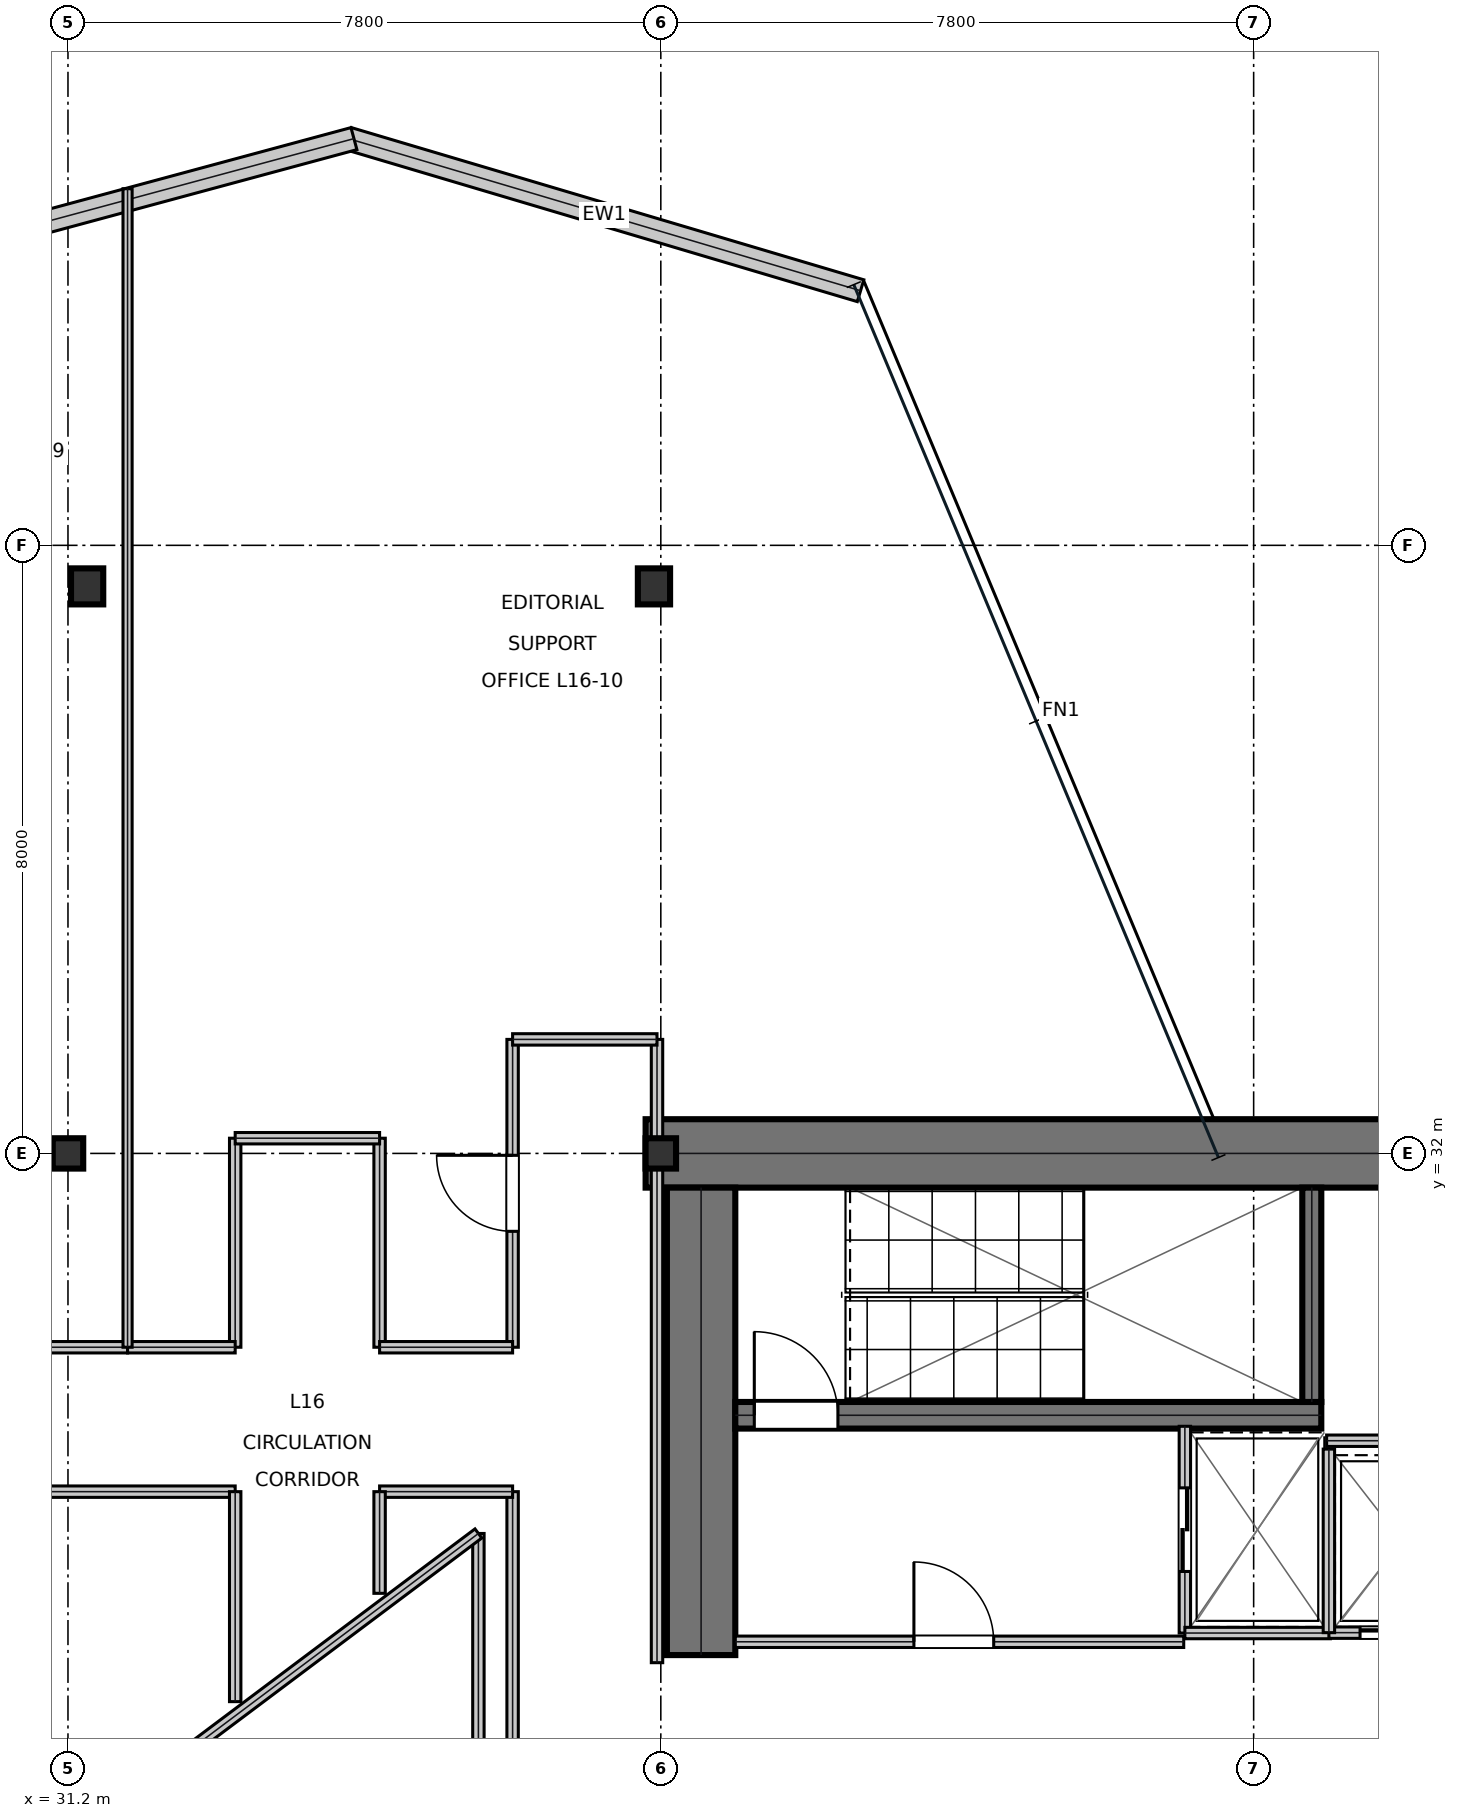
"""IFC4 building model, lengths in metres.
Left out: names, types, materials, properties, quantities, classifications, styles, units other than length and angle.
Written with IfcOpenShell. Run it as: python <this file> out.ifc"""

import sys

from ifc_helpers import new_model, si_unit, direction, frame, frame_2d, origin, origin_2d, place, context, subcontext, project, spatial, rectangle, i_section, extrude, element, fill, save


model = new_model("IFC4")
c1 = context("Model", 3, precision=1e-05, world=origin(), true_north=direction((0.0, 1.0)))
c2 = subcontext(c1, "Body", "Model", "MODEL_VIEW")
j1 = project(units=[si_unit("LENGTHUNIT", "METRE"), si_unit("PLANEANGLEUNIT", "RADIAN")], contexts=[c1])
p1 = place(None, origin())
s1 = spatial("IfcSite", under=j1, at=p1, CompositionType="ELEMENT")
p2 = place(p1, origin())
s2 = spatial("IfcBuilding", under=s1, at=p2, CompositionType="ELEMENT")
p3 = place(p2, frame((0.0, 0.0, 74.25)))
s3 = spatial("IfcBuildingStorey", under=s2, at=p3, CompositionType="ELEMENT", Elevation=74.25)
p4 = place(p3, frame((38.8, 32.0, 0.0), z_axis=(0.0, 0.0, 1.0), x_axis=(1.0, 0.0, 0.0)))
e1 = element("IfcWall", 1, at=p4, inside=s3, PredefinedType="SHEAR", context=c2, shape_type="SweptSolid", body=[
    extrude(rectangle(XDim=16.0, YDim=0.9, at=frame_2d((8.0, 0.0))), origin(), (0.0, 0.0, 1.0), 3.81),
])
p5 = place(p3, frame((39.53, 25.4, 0.0), z_axis=(0.0, 0.0, 1.0), x_axis=(0.0, 1.0, 0.0)))
e2 = element("IfcWall", 2, at=p5, inside=s3, PredefinedType="SHEAR", context=c2, shape_type="SweptSolid", body=[
    extrude(rectangle(XDim=6.15, YDim=0.9, at=frame_2d((3.075, 0.0))), origin(), (0.0, 0.0, 1.0), 3.81),
])
p6 = place(p3, frame((39.98, 28.555, 0.0), z_axis=(0.0, 0.0, 1.0), x_axis=(1.0, 0.0, 0.0)))
e3 = element("IfcWall", 3, at=p6, inside=s3, PredefinedType="SHEAR", context=c2, shape_type="SweptSolid", body=[
    extrude(rectangle(XDim=7.71, YDim=0.35, at=frame_2d((3.855, 0.0))), origin(), (0.0, 0.0, 1.0), 3.81),
])
p7 = place(p6, frame((0.25, 0.0, 0.0)))
e4 = element("IfcOpeningElement", 4, at=p7, cuts=e3, PredefinedType="OPENING", context=c2, shape_type="SweptSolid", body=[
    extrude(rectangle(XDim=1.1, YDim=2.15, at=frame_2d((0.55, 1.075))), frame((0.0, 0.185, 0.0), z_axis=(0.0, -1.0, 0.0), x_axis=(1.0, 0.0, 0.0)), (0.0, 0.0, 1.0), 0.37),
])
p8 = place(p3, frame((47.565, 28.73, 0.0), z_axis=(0.0, 0.0, 1.0), x_axis=(0.0, 1.0, 0.0)))
e5 = element("IfcWall", 5, at=p8, inside=s3, PredefinedType="SHEAR", context=c2, shape_type="SweptSolid", body=[
    extrude(rectangle(XDim=2.82, YDim=0.25, at=frame_2d((1.41, 0.0))), origin(), (0.0, 0.0, 1.0), 3.81),
])
for number, where, z_axis, x_axis in (
    (6, (31.2, 32.0, 0.0), (0.0, 0.0, 1.0), (1.0, 0.0, 0.0)),
    (7, (39.0, 32.0, 0.0), (0.0, 0.0, 1.0), (1.0, 0.0, 0.0)),
):
    element("IfcColumn", number, at=place(p3, frame(where, z_axis=z_axis, x_axis=x_axis)), inside=s3, PredefinedType="COLUMN", context=c2, shape_type="SweptSolid", body=[
        extrude(i_section(OverallWidth=0.401, OverallDepth=0.399, WebThickness=0.025, FlangeThickness=0.04, at=origin_2d()), origin(), (0.0, 0.0, 1.0), 4.044),
    ])
for number, where, z_axis, x_axis in (
    (8, (31.452, 39.46, 0.016), (0.0, 0.0, 1.0), (1.0, 0.0, 0.0)),
    (9, (38.91, 39.46, 0.016), (0.0, 0.0, 1.0), (1.0, 0.0, 0.0)),
):
    element("IfcColumn", number, at=place(p3, frame(where, z_axis=z_axis, x_axis=x_axis)), inside=s3, PredefinedType="COLUMN", context=c2, shape_type="SweptSolid", body=[
        extrude(i_section(OverallWidth=0.424, OverallDepth=0.474, WebThickness=0.048, FlangeThickness=0.077, at=origin_2d()), origin(), (0.0, 0.0, 1.0), 4.018),
    ])
p9 = place(p3, frame((41.628, 43.35, 0.0), z_axis=(0.0, 0.0, 1.0), x_axis=(-0.958632659024, 0.284646140064, 0.0)))
e10 = element("IfcWall", 10, at=p9, inside=s3, PredefinedType="STANDARD", context=c2, shape_type="SweptSolid", body=[
    extrude(rectangle(XDim=7.033, YDim=0.3, at=frame_2d((3.517, 0.0))), origin(), (0.0, 0.0, 1.0), 3.81),
])
p10 = place(p3, frame((34.962, 45.351, 0.0), z_axis=(0.0, 0.0, 1.0), x_axis=(-0.965438319853, -0.260631637679, 0.0)))
e11 = element("IfcWall", 11, at=p10, inside=s3, PredefinedType="STANDARD", context=c2, shape_type="SweptSolid", body=[
    extrude(rectangle(XDim=6.983, YDim=0.3, at=frame_2d((3.492, 0.0))), origin(), (0.0, 0.0, 1.0), 3.81),
])
p11 = place(p3, frame((39.98, 25.575, 0.0), z_axis=(0.0, 0.0, 1.0), x_axis=(1.0, 0.0, 0.0)))
e12 = element("IfcWall", 12, at=p11, inside=s3, PredefinedType="PARTITIONING", context=c2, shape_type="SweptSolid", body=[
    extrude(rectangle(XDim=5.9, YDim=0.15, at=frame_2d((2.95, 0.0))), origin(), (0.0, 0.0, 1.0), 3.81),
])
p12 = place(p11, frame((2.35, 0.0, 0.0)))
e13 = element("IfcOpeningElement", 13, at=p12, cuts=e12, PredefinedType="OPENING", context=c2, shape_type="SweptSolid", body=[
    extrude(rectangle(XDim=1.05, YDim=2.15, at=frame_2d((0.525, 1.075))), frame((0.0, 0.085, 0.0), z_axis=(0.0, -1.0, 0.0), x_axis=(1.0, 0.0, 0.0)), (0.0, 0.0, 1.0), 0.17),
])
p13 = place(p3, frame((45.895, 25.69, 0.0), z_axis=(0.0, 0.0, 1.0), x_axis=(0.0, 1.0, 0.0)))
e14 = element("IfcWall", 14, at=p13, inside=s3, PredefinedType="PARTITIONING", context=c2, shape_type="SweptSolid", body=[
    extrude(rectangle(XDim=2.72, YDim=0.15, at=frame_2d((1.36, 0.0))), origin(), (0.0, 0.0, 1.0), 3.81),
])
p14 = place(p13, frame((0.81, 0.0, 0.0)))
e15 = element("IfcOpeningElement", 15, at=p14, cuts=e14, PredefinedType="OPENING", context=c2, shape_type="SweptSolid", body=[
    extrude(rectangle(XDim=1.1, YDim=2.15, at=frame_2d((0.55, 1.075))), frame((0.0, 0.085, 0.0), z_axis=(0.0, -1.0, 0.0), x_axis=(1.0, 0.0, 0.0)), (0.0, 0.0, 1.0), 0.17),
])
p15 = place(p3, frame((45.895, 25.69, 0.0), z_axis=(0.0, 0.0, 1.0), x_axis=(1.0, 0.0, 0.0)))
e16 = element("IfcWall", 16, at=p15, inside=s3, PredefinedType="PARTITIONING", context=c2, shape_type="SweptSolid", body=[
    extrude(rectangle(XDim=1.915, YDim=0.15, at=frame_2d((0.958, 0.0))), origin(), (0.0, 0.0, 1.0), 3.81),
])
p16 = place(p3, frame((47.79, 25.695, 0.0), z_axis=(0.0, 0.0, 1.0), x_axis=(1.0, 0.0, 0.0)))
e17 = element("IfcWall", 17, at=p16, inside=s3, PredefinedType="PARTITIONING", context=c2, shape_type="SweptSolid", body=[
    extrude(rectangle(XDim=1.92, YDim=0.15, at=frame_2d((0.96, 0.0))), origin(), (0.0, 0.0, 1.0), 3.81),
])
p17 = place(p16, frame((0.41, 0.0, 0.0)))
e18 = element("IfcOpeningElement", 18, at=p17, cuts=e17, PredefinedType="OPENING", context=c2, shape_type="SweptSolid", body=[
    extrude(rectangle(XDim=1.1, YDim=2.15, at=frame_2d((0.55, 1.075))), frame((0.0, 0.085, 0.0), z_axis=(0.0, -1.0, 0.0), x_axis=(1.0, 0.0, 0.0)), (0.0, 0.0, 1.0), 0.17),
])
p18 = place(p3, frame((47.79, 25.695, 0.0), z_axis=(0.0, 0.0, 1.0), x_axis=(0.0, 1.0, 0.0)))
e19 = element("IfcWall", 19, at=p18, inside=s3, PredefinedType="PARTITIONING", context=c2, shape_type="SweptSolid", body=[
    extrude(rectangle(XDim=2.415, YDim=0.15, at=frame_2d((1.208, 0.0))), origin(), (0.0, 0.0, 1.0), 3.81),
])
p19 = place(p3, frame((47.76, 28.22, 0.0), z_axis=(0.0, 0.0, 1.0), x_axis=(1.0, 0.0, 0.0)))
e20 = element("IfcWall", 20, at=p19, inside=s3, PredefinedType="PARTITIONING", context=c2, shape_type="SweptSolid", body=[
    extrude(rectangle(XDim=1.96, YDim=0.15, at=frame_2d((0.98, 0.0))), origin(), (0.0, 0.0, 1.0), 3.81),
])
p20 = place(p3, frame((37.05, 14.5, 0.0), z_axis=(0.0, 0.0, 1.0), x_axis=(0.0, 1.0, 0.0)))
e21 = element("IfcWall", 21, at=p20, inside=s3, PredefinedType="PARTITIONING", context=c2, shape_type="SweptSolid", body=[
    extrude(rectangle(XDim=13.05, YDim=0.15, at=frame_2d((6.525, 0.0))), origin(), (0.0, 0.0, 1.0), 3.181),
])
p21 = place(p20, frame((4.585, 0.0, 0.0)))
e22 = element("IfcOpeningElement", 22, at=p21, cuts=e21, PredefinedType="OPENING", context=c2, shape_type="SweptSolid", body=[
    extrude(rectangle(XDim=1.0, YDim=2.15, at=frame_2d((0.5, 1.075))), frame((0.0, 0.085, 0.0), z_axis=(0.0, -1.0, 0.0), x_axis=(1.0, 0.0, 0.0)), (0.0, 0.0, 1.0), 0.17),
])
p22 = place(p3, frame((21.4, 27.55, 0.0), z_axis=(0.0, 0.0, 1.0), x_axis=(1.0, 0.0, 0.0)))
e23 = element("IfcWall", 23, at=p22, inside=s3, PredefinedType="PARTITIONING", context=c2, shape_type="SweptSolid", body=[
    extrude(rectangle(XDim=12.0, YDim=0.15, at=frame_2d((6.0, 0.0))), origin(), (0.0, 0.0, 1.0), 3.181),
])
p23 = place(p22, frame((5.5, 0.0, 0.0)))
e24 = element("IfcOpeningElement", 24, at=p23, cuts=e23, PredefinedType="OPENING", context=c2, shape_type="SweptSolid", body=[
    extrude(rectangle(XDim=1.0, YDim=2.15, at=frame_2d((0.5, 1.075))), frame((0.0, 0.085, 0.0), z_axis=(0.0, -1.0, 0.0), x_axis=(1.0, 0.0, 0.0)), (0.0, 0.0, 1.0), 0.17),
])
p24 = place(p3, frame((14.62, 29.45, 0.0), z_axis=(0.0, 0.0, 1.0), x_axis=(1.0, 0.0, 0.0)))
e25 = element("IfcWall", 25, at=p24, inside=s3, PredefinedType="PARTITIONING", context=c2, shape_type="SweptSolid", body=[
    extrude(rectangle(XDim=17.364, YDim=0.15, at=frame_2d((8.682, 0.0))), origin(), (0.0, 0.0, 1.0), 3.181),
])
p25 = place(p24, frame((11.962, 0.0, 0.0)))
e26 = element("IfcOpeningElement", 26, at=p25, cuts=e25, PredefinedType="OPENING", context=c2, shape_type="SweptSolid", body=[
    extrude(rectangle(XDim=1.0, YDim=2.15, at=frame_2d((0.5, 1.075))), frame((0.0, 0.085, 0.0), z_axis=(0.0, -1.0, 0.0), x_axis=(1.0, 0.0, 0.0)), (0.0, 0.0, 1.0), 0.17),
])
p26 = place(p3, frame((37.05, 29.45, 0.0), z_axis=(0.0, 0.0, 1.0), x_axis=(0.0, 1.0, 0.0)))
e27 = element("IfcWall", 27, at=p26, inside=s3, PredefinedType="PARTITIONING", context=c2, shape_type="SweptSolid", body=[
    extrude(rectangle(XDim=4.05, YDim=0.15, at=frame_2d((2.025, 0.0))), origin(), (0.0, 0.0, 1.0), 3.181),
])
p27 = place(p26, frame((1.525, 0.0, 0.0)))
e28 = element("IfcOpeningElement", 28, at=p27, cuts=e27, PredefinedType="OPENING", context=c2, shape_type="SweptSolid", body=[
    extrude(rectangle(XDim=1.0, YDim=2.15, at=frame_2d((0.5, 1.075))), frame((0.0, 0.085, 0.0), z_axis=(0.0, -1.0, 0.0), x_axis=(1.0, 0.0, 0.0)), (0.0, 0.0, 1.0), 0.17),
])
p28 = place(p3, frame((35.3, 27.55, 0.0), z_axis=(0.0, 0.0, 1.0), x_axis=(1.0, 0.0, 0.0)))
e29 = element("IfcWall", 29, at=p28, inside=s3, PredefinedType="PARTITIONING", context=c2, shape_type="SweptSolid", body=[
    extrude(rectangle(XDim=1.75, YDim=0.15, at=frame_2d((0.875, 0.0))), origin(), (0.0, 0.0, 1.0), 3.391),
])
p29 = place(p3, frame((35.3, 26.212, 0.0), z_axis=(0.0, 0.0, 1.0), x_axis=(0.0, 1.0, 0.0)))
e30 = element("IfcWall", 30, at=p29, inside=s3, PredefinedType="PARTITIONING", context=c2, shape_type="SweptSolid", body=[
    extrude(rectangle(XDim=1.338, YDim=0.15, at=frame_2d((0.669, 0.0))), origin(), (0.0, 0.0, 1.0), 3.81),
])
p30 = place(p3, frame((33.4, 24.788, 0.0), z_axis=(0.0, 0.0, 1.0), x_axis=(0.0, 1.0, 0.0)))
e31 = element("IfcWall", 31, at=p30, inside=s3, PredefinedType="PARTITIONING", context=c2, shape_type="SweptSolid", body=[
    extrude(rectangle(XDim=2.762, YDim=0.15, at=frame_2d((1.381, 0.0))), origin(), (0.0, 0.0, 1.0), 3.81),
])
p31 = place(p3, frame((38.95, 25.3, 0.0), z_axis=(0.0, 0.0, 1.0), x_axis=(0.0, 1.0, 0.0)))
e32 = element("IfcWall", 32, at=p31, inside=s3, PredefinedType="PARTITIONING", context=c2, shape_type="SweptSolid", body=[
    extrude(rectangle(XDim=8.2, YDim=0.15, at=frame_2d((4.1, 0.0))), origin(), (0.0, 0.0, 1.0), 3.181),
])
for number, where, z_axis, x_axis in (
    (33, (33.4, 29.45, 0.0), (0.0, 0.0, 1.0), (0.0, 1.0, 0.0)),
    (34, (35.3, 29.45, 0.0), (0.0, 0.0, 1.0), (0.0, 1.0, 0.0)),
):
    element("IfcWall", number, at=place(p3, frame(where, z_axis=z_axis, x_axis=x_axis)), inside=s3, PredefinedType="PARTITIONING", context=c2, shape_type="SweptSolid", body=[
        extrude(rectangle(XDim=2.75, YDim=0.15, at=frame_2d((1.375, 0.0))), origin(), (0.0, 0.0, 1.0), 3.181),
    ])
p32 = place(p3, frame((37.05, 33.5, 0.0), z_axis=(0.0, 0.0, 1.0), x_axis=(1.0, 0.0, 0.0)))
e35 = element("IfcWall", 35, at=p32, inside=s3, PredefinedType="PARTITIONING", context=c2, shape_type="SweptSolid", body=[
    extrude(rectangle(XDim=1.9, YDim=0.15, at=frame_2d((0.95, 0.0))), origin(), (0.0, 0.0, 1.0), 3.81),
])
p33 = place(p3, frame((33.4, 32.2, 0.0), z_axis=(0.0, 0.0, 1.0), x_axis=(1.0, 0.0, 0.0)))
e36 = element("IfcWall", 36, at=p33, inside=s3, PredefinedType="PARTITIONING", context=c2, shape_type="SweptSolid", body=[
    extrude(rectangle(XDim=1.9, YDim=0.15, at=frame_2d((0.95, 0.0))), origin(), (0.0, 0.0, 1.0), 3.181),
])
p34 = place(p3, frame((35.3, 29.45, 0.0), z_axis=(0.0, 0.0, 1.0), x_axis=(1.0, 0.0, 0.0)))
e37 = element("IfcWall", 37, at=p34, inside=s3, PredefinedType="PARTITIONING", context=c2, shape_type="SweptSolid", body=[
    extrude(rectangle(XDim=1.75, YDim=0.15, at=frame_2d((0.875, 0.0))), origin(), (0.0, 0.0, 1.0), 3.81),
])
p35 = place(p3, frame((31.984, 29.45, 0.0), z_axis=(0.0, 0.0, 1.0), x_axis=(1.0, 0.0, 0.0)))
e38 = element("IfcWall", 38, at=p35, inside=s3, PredefinedType="PARTITIONING", context=c2, shape_type="SweptSolid", body=[
    extrude(rectangle(XDim=1.416, YDim=0.15, at=frame_2d((0.708, 0.0))), origin(), (0.0, 0.0, 1.0), 3.81),
])
p36 = place(p3, frame((31.984, 29.45, 0.0), z_axis=(0.0, 0.0, 1.0), x_axis=(0.0, 1.0, 0.0)))
e39 = element("IfcWall", 39, at=p36, inside=s3, PredefinedType="PARTITIONING", context=c2, shape_type="SweptSolid", body=[
    extrude(rectangle(XDim=15.242, YDim=0.12, at=frame_2d((7.621, 0.0))), origin(), (0.0, 0.0, 1.0), 3.181),
])
p37 = place(p3, frame((36.6, 21.0, 0.0), z_axis=(0.0, 0.0, 1.0), x_axis=(0.0, 1.0, 0.0)))
e40 = element("IfcWall", 40, at=p37, inside=s3, PredefinedType="MOVABLE", context=c2, shape_type="SweptSolid", body=[
    extrude(rectangle(XDim=6.0, YDim=0.15, at=frame_2d((3.0, 0.0))), origin(), (0.0, 0.0, 1.0), 3.81),
])
p38 = place(p3, frame((36.6, 27.0, 0.0), z_axis=(0.0, 0.0, 1.0), x_axis=(-0.8, -0.6, 0.0)))
e41 = element("IfcWall", 41, at=p38, inside=s3, PredefinedType="MOVABLE", context=c2, shape_type="SweptSolid", body=[
    extrude(rectangle(XDim=5.0, YDim=0.15, at=frame_2d((2.5, 0.0))), origin(), (0.0, 0.0, 1.0), 3.81),
])
p39 = place(p12, origin())
e42 = element("IfcDoor", 42, at=p39, inside=s3, OperationType="SINGLE_SWING_LEFT", PredefinedType="DOOR", context=c2, shape_type="SweptSolid", body=[
    extrude(rectangle(XDim=1.05, YDim=2.15, at=frame_2d((0.525, 1.075))), frame((0.0, 0.025, 0.0), z_axis=(0.0, -1.0, 0.0), x_axis=(1.0, 0.0, 0.0)), (0.0, 0.0, 1.0), 0.05),
])
fill(e13, e42)
p40 = place(p14, frame((1.1, 0.0, 0.0), z_axis=(0.0, 0.0, 1.0), x_axis=(-1.0, 0.0, 0.0)))
e43 = element("IfcDoor", 43, at=p40, inside=s3, OperationType="DOUBLE_DOOR_SLIDING", PredefinedType="DOOR", context=c2, shape_type="SweptSolid", body=[
    extrude(rectangle(XDim=1.1, YDim=2.15, at=frame_2d((0.55, 1.075))), frame((0.0, 0.025, 0.0), z_axis=(0.0, -1.0, 0.0), x_axis=(1.0, 0.0, 0.0)), (0.0, 0.0, 1.0), 0.05),
])
fill(e15, e43)
p41 = place(p17, frame((1.1, 0.0, 0.0), z_axis=(0.0, 0.0, 1.0), x_axis=(-1.0, 0.0, 0.0)))
e44 = element("IfcDoor", 44, at=p41, inside=s3, OperationType="DOUBLE_DOOR_SLIDING", PredefinedType="DOOR", context=c2, shape_type="SweptSolid", body=[
    extrude(rectangle(XDim=1.1, YDim=2.15, at=frame_2d((0.55, 1.075))), frame((0.0, 0.025, 0.0), z_axis=(0.0, -1.0, 0.0), x_axis=(1.0, 0.0, 0.0)), (0.0, 0.0, 1.0), 0.05),
])
fill(e18, e44)
p42 = place(p27, origin())
e45 = element("IfcDoor", 45, at=p42, inside=s3, OperationType="SINGLE_SWING_RIGHT", PredefinedType="DOOR", context=c2, shape_type="SweptSolid", body=[
    extrude(rectangle(XDim=1.0, YDim=2.15, at=frame_2d((0.5, 1.075))), frame((0.0, 0.025, 0.0), z_axis=(0.0, -1.0, 0.0), x_axis=(1.0, 0.0, 0.0)), (0.0, 0.0, 1.0), 0.05),
])
fill(e28, e45)
p43 = place(p7, origin())
e46 = element("IfcDoor", 46, at=p43, inside=s3, OperationType="SINGLE_SWING_LEFT", PredefinedType="DOOR", context=c2, shape_type="SweptSolid", body=[
    extrude(rectangle(XDim=1.1, YDim=2.15, at=frame_2d((0.55, 1.075))), frame((0.0, 0.025, 0.0), z_axis=(0.0, -1.0, 0.0), x_axis=(1.0, 0.0, 0.0)), (0.0, 0.0, 1.0), 0.05),
])
fill(e4, e46)
save(model, sys.argv[1])
